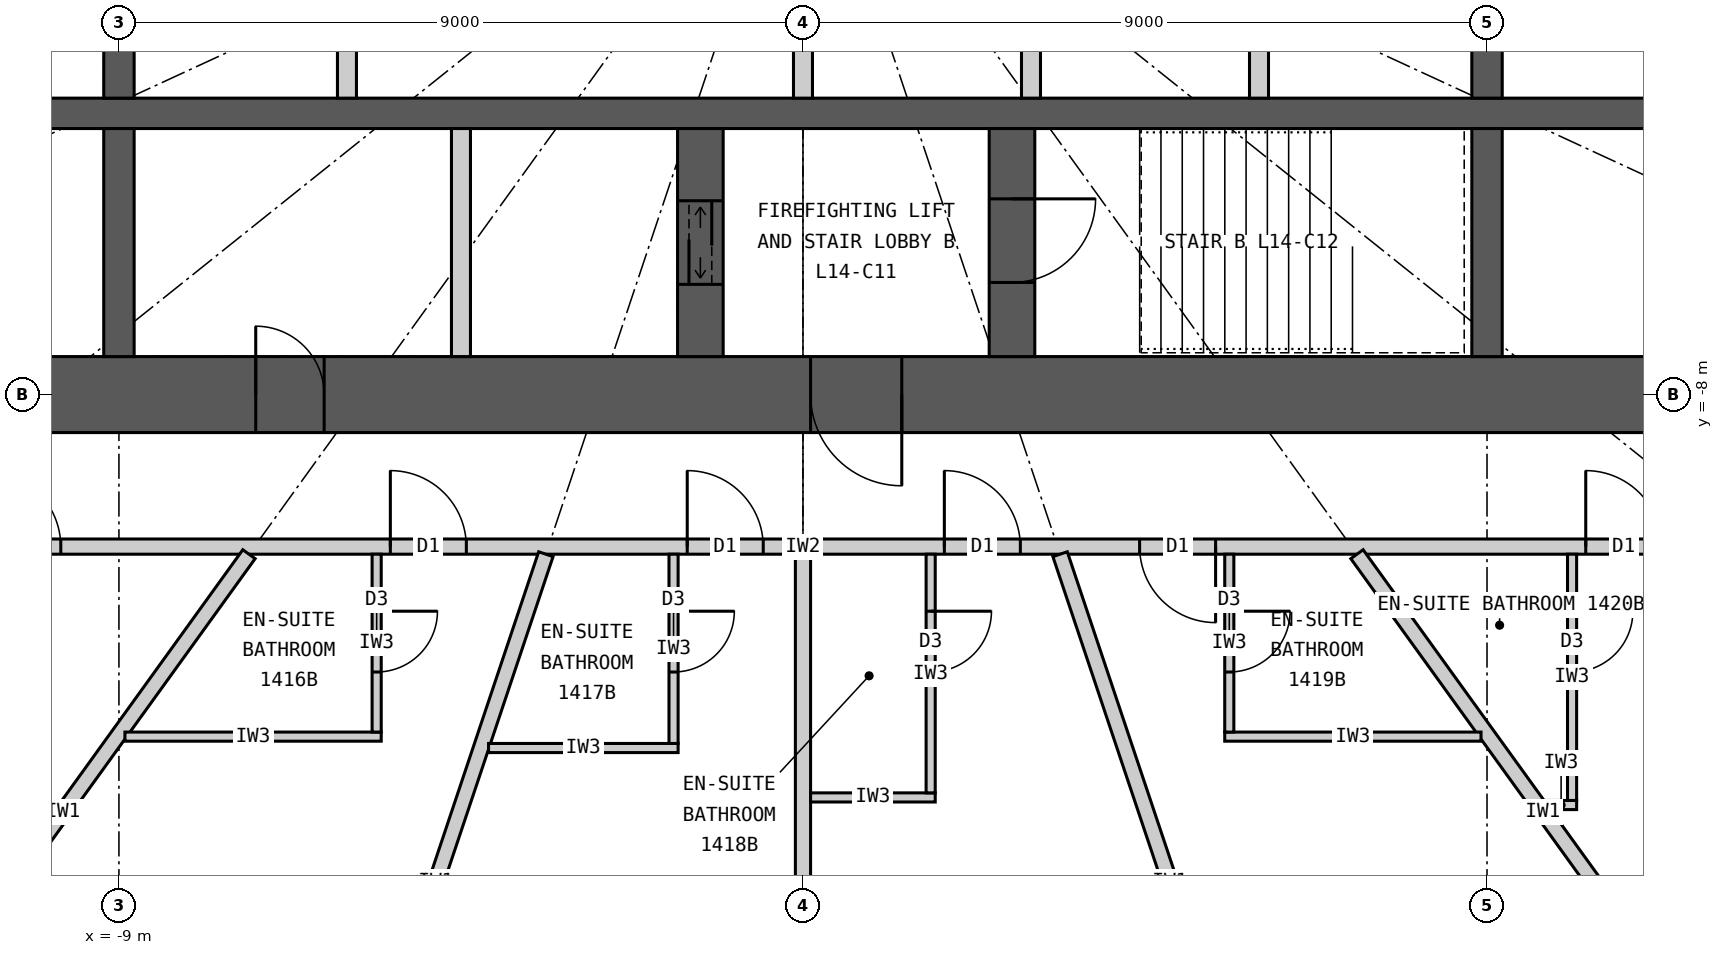
"""IFC4 building model, lengths in metres.
Left out: names, types, materials, properties, quantities, classifications, styles, units other than length and angle.
Written with IfcOpenShell. Run it as: python <this file> out.ifc"""

import sys

from ifc_helpers import new_model, si_unit, direction, frame, frame_2d, origin, place, context, subcontext, project, spatial, rectangle, extrude, element, fill, save


model = new_model("IFC4")
c1 = context("Model", 3, precision=1e-05, world=origin(), true_north=direction((0.0, 1.0)))
c2 = subcontext(c1, "Body", "Model", "MODEL_VIEW")
j1 = project(units=[si_unit("LENGTHUNIT", "METRE"), si_unit("PLANEANGLEUNIT", "RADIAN")], contexts=[c1])
p1 = place(None, origin())
s1 = spatial("IfcSite", under=j1, at=p1, CompositionType="ELEMENT")
p2 = place(p1, origin())
s2 = spatial("IfcBuilding", under=s1, at=p2, CompositionType="ELEMENT")
p3 = place(p2, frame((0.0, 0.0, 60.6)))
s3 = spatial("IfcBuildingStorey", under=s2, at=p3, CompositionType="ELEMENT", Elevation=60.6)
p4 = place(p3, frame((12.5, -8.0, 0.0), z_axis=(0.0, 0.0, 1.0), x_axis=(-1.0, 0.0, 0.0)))
e1 = element("IfcWall", 1, at=p4, inside=s3, PredefinedType="SHEAR", context=c2, shape_type="SweptSolid", body=[
    extrude(rectangle(XDim=25.0, YDim=1.0, at=frame_2d((12.5, 0.0))), origin(), (0.0, 0.0, 1.0), 3.3),
])
p5 = place(p4, frame((11.2, 0.0, 0.0)))
e2 = element("IfcOpeningElement", 2, at=p5, cuts=e1, PredefinedType="OPENING", context=c2, shape_type="SweptSolid", body=[
    extrude(rectangle(XDim=1.2, YDim=2.2, at=frame_2d((0.6, 1.1))), frame((0.0, 0.51, 0.0), z_axis=(0.0, -1.0, 0.0), x_axis=(1.0, 0.0, 0.0)), (0.0, 0.0, 1.0), 1.02),
])
p6 = place(p4, frame((18.8, 0.0, 0.0)))
e3 = element("IfcOpeningElement", 3, at=p6, cuts=e1, PredefinedType="OPENING", context=c2, shape_type="SweptSolid", body=[
    extrude(rectangle(XDim=0.9, YDim=2.2, at=frame_2d((0.45, 1.1))), frame((0.0, 0.51, 0.0), z_axis=(0.0, -1.0, 0.0), x_axis=(1.0, 0.0, 0.0)), (0.0, 0.0, 1.0), 1.02),
])
p7 = place(p3, frame((-11.5, -4.3, 0.0), z_axis=(0.0, 0.0, 1.0), x_axis=(1.0, 0.0, 0.0)))
e4 = element("IfcWall", 4, at=p7, inside=s3, PredefinedType="SHEAR", context=c2, shape_type="SweptSolid", body=[
    extrude(rectangle(XDim=23.0, YDim=0.4, at=frame_2d((11.5, 0.0))), origin(), (0.0, 0.0, 1.0), 3.3),
])
p8 = place(p3, frame((-9.0, -4.1, 0.0), z_axis=(0.0, 0.0, 1.0), x_axis=(0.0, 1.0, 0.0)))
e5 = element("IfcWall", 5, at=p8, inside=s3, PredefinedType="SHEAR", context=c2, shape_type="SweptSolid", body=[
    extrude(rectangle(XDim=2.35, YDim=0.4, at=frame_2d((1.175, 0.0))), origin(), (0.0, 0.0, 1.0), 3.3),
])
p9 = place(p3, frame((-9.0, -7.5, 0.0), z_axis=(0.0, 0.0, 1.0), x_axis=(0.0, 1.0, 0.0)))
e6 = element("IfcWall", 6, at=p9, inside=s3, PredefinedType="SHEAR", context=c2, shape_type="SweptSolid", body=[
    extrude(rectangle(XDim=3.0, YDim=0.4, at=frame_2d((1.5, 0.0))), origin(), (0.0, 0.0, 1.0), 3.3),
])
p10 = place(p3, frame((9.0, -4.1, 0.0), z_axis=(0.0, 0.0, 1.0), x_axis=(0.0, 1.0, 0.0)))
e7 = element("IfcWall", 7, at=p10, inside=s3, PredefinedType="SHEAR", context=c2, shape_type="SweptSolid", body=[
    extrude(rectangle(XDim=2.35, YDim=0.4, at=frame_2d((1.175, 0.0))), origin(), (0.0, 0.0, 1.0), 3.3),
])
p11 = place(p3, frame((9.0, -7.5, 0.0), z_axis=(0.0, 0.0, 1.0), x_axis=(0.0, 1.0, 0.0)))
e8 = element("IfcWall", 8, at=p11, inside=s3, PredefinedType="SHEAR", context=c2, shape_type="SweptSolid", body=[
    extrude(rectangle(XDim=3.0, YDim=0.4, at=frame_2d((1.5, 0.0))), origin(), (0.0, 0.0, 1.0), 3.3),
])
p12 = place(p3, frame((2.75, -7.5, 0.0), z_axis=(0.0, 0.0, 1.0), x_axis=(0.0, 1.0, 0.0)))
e9 = element("IfcWall", 9, at=p12, inside=s3, PredefinedType="SHEAR", context=c2, shape_type="SweptSolid", body=[
    extrude(rectangle(XDim=3.0, YDim=0.6, at=frame_2d((1.5, 0.0))), origin(), (0.0, 0.0, 1.0), 3.3),
])
p13 = place(p12, frame((0.975, 0.0, 0.0)))
e10 = element("IfcOpeningElement", 10, at=p13, cuts=e9, PredefinedType="OPENING", context=c2, shape_type="SweptSolid", body=[
    extrude(rectangle(XDim=1.1, YDim=2.2, at=frame_2d((0.55, 1.1))), frame((0.0, 0.31, 0.0), z_axis=(0.0, -1.0, 0.0), x_axis=(1.0, 0.0, 0.0)), (0.0, 0.0, 1.0), 0.62),
])
p14 = place(p3, frame((-1.35, -7.5, 0.0), z_axis=(0.0, 0.0, 1.0), x_axis=(0.0, 1.0, 0.0)))
e11 = element("IfcWall", 11, at=p14, inside=s3, PredefinedType="SHEAR", context=c2, shape_type="SweptSolid", body=[
    extrude(rectangle(XDim=3.0, YDim=0.6, at=frame_2d((1.5, 0.0))), origin(), (0.0, 0.0, 1.0), 3.3),
])
p15 = place(p14, frame((0.95, 0.0, 0.0)))
e12 = element("IfcOpeningElement", 12, at=p15, cuts=e11, PredefinedType="OPENING", context=c2, shape_type="SweptSolid", body=[
    extrude(rectangle(XDim=1.1, YDim=2.2, at=frame_2d((0.55, 1.1))), frame((0.0, 0.31, 0.0), z_axis=(0.0, -1.0, 0.0), x_axis=(1.0, 0.0, 0.0)), (0.0, 0.0, 1.0), 0.62),
])
p16 = place(p3, frame((-4.5, -7.5, 0.0), z_axis=(0.0, 0.0, 1.0), x_axis=(0.0, 1.0, 0.0)))
e13 = element("IfcWall", 13, at=p16, inside=s3, PredefinedType="PARTITIONING", context=c2, shape_type="SweptSolid", body=[
    extrude(rectangle(XDim=3.0, YDim=0.25, at=frame_2d((1.5, 0.0))), origin(), (0.0, 0.0, 1.0), 3.3),
])
for number, where, z_axis, x_axis in (
    (14, (-6.0, -4.1, 0.0), (0.0, 0.0, 1.0), (0.0, 1.0, 0.0)),
    (15, (0.0, -4.1, 0.0), (0.0, 0.0, 1.0), (0.0, 1.0, 0.0)),
    (16, (3.0, -4.1, 0.0), (0.0, 0.0, 1.0), (0.0, 1.0, 0.0)),
    (17, (6.0, -4.1, 0.0), (0.0, 0.0, 1.0), (0.0, 1.0, 0.0)),
):
    element("IfcWall", number, at=place(p3, frame(where, z_axis=z_axis, x_axis=x_axis)), inside=s3, PredefinedType="PARTITIONING", context=c2, shape_type="SweptSolid", body=[
        extrude(rectangle(XDim=2.35, YDim=0.25, at=frame_2d((1.175, 0.0))), origin(), (0.0, 0.0, 1.0), 3.3),
    ])
p17 = place(p3, frame((14.1, -10.0, 0.0), z_axis=(0.0, 0.0, 1.0), x_axis=(-1.0, 0.0, 0.0)))
e18 = element("IfcWall", 18, at=p17, inside=s3, PredefinedType="PARTITIONING", context=c2, shape_type="SweptSolid", body=[
    extrude(rectangle(XDim=28.2, YDim=0.2, at=frame_2d((14.1, 0.0))), origin(), (0.0, 0.0, 1.0), 3.12),
])
p18 = place(p17, frame((23.865, 0.0, 0.0)))
e19 = element("IfcOpeningElement", 19, at=p18, cuts=e18, PredefinedType="OPENING", context=c2, shape_type="SweptSolid", body=[
    extrude(rectangle(XDim=1.0, YDim=2.2, at=frame_2d((0.5, 1.1))), frame((0.0, 0.11, 0.0), z_axis=(0.0, -1.0, 0.0), x_axis=(1.0, 0.0, 0.0)), (0.0, 0.0, 1.0), 0.22),
])
p19 = place(p17, frame((18.529, 0.0, 0.0)))
e20 = element("IfcOpeningElement", 20, at=p19, cuts=e18, PredefinedType="OPENING", context=c2, shape_type="SweptSolid", body=[
    extrude(rectangle(XDim=1.0, YDim=2.2, at=frame_2d((0.5, 1.1))), frame((0.0, 0.11, 0.0), z_axis=(0.0, -1.0, 0.0), x_axis=(1.0, 0.0, 0.0)), (0.0, 0.0, 1.0), 0.22),
])
p20 = place(p17, frame((14.623, 0.0, 0.0)))
e21 = element("IfcOpeningElement", 21, at=p20, cuts=e18, PredefinedType="OPENING", context=c2, shape_type="SweptSolid", body=[
    extrude(rectangle(XDim=1.0, YDim=2.2, at=frame_2d((0.5, 1.1))), frame((0.0, 0.11, 0.0), z_axis=(0.0, -1.0, 0.0), x_axis=(1.0, 0.0, 0.0)), (0.0, 0.0, 1.0), 0.22),
])
p21 = place(p17, frame((11.24, 0.0, 0.0)))
e22 = element("IfcOpeningElement", 22, at=p21, cuts=e18, PredefinedType="OPENING", context=c2, shape_type="SweptSolid", body=[
    extrude(rectangle(XDim=1.0, YDim=2.2, at=frame_2d((0.5, 1.1))), frame((0.0, 0.11, 0.0), z_axis=(0.0, -1.0, 0.0), x_axis=(1.0, 0.0, 0.0)), (0.0, 0.0, 1.0), 0.22),
])
p22 = place(p17, frame((8.671, 0.0, 0.0)))
e23 = element("IfcOpeningElement", 23, at=p22, cuts=e18, PredefinedType="OPENING", context=c2, shape_type="SweptSolid", body=[
    extrude(rectangle(XDim=1.0, YDim=2.2, at=frame_2d((0.5, 1.1))), frame((0.0, 0.11, 0.0), z_axis=(0.0, -1.0, 0.0), x_axis=(1.0, 0.0, 0.0)), (0.0, 0.0, 1.0), 0.22),
])
p23 = place(p17, frame((2.801, 0.0, 0.0)))
e24 = element("IfcOpeningElement", 24, at=p23, cuts=e18, PredefinedType="OPENING", context=c2, shape_type="SweptSolid", body=[
    extrude(rectangle(XDim=1.0, YDim=2.2, at=frame_2d((0.5, 1.1))), frame((0.0, 0.11, 0.0), z_axis=(0.0, -1.0, 0.0), x_axis=(1.0, 0.0, 0.0)), (0.0, 0.0, 1.0), 0.22),
])
p24 = place(p3, frame((-7.289, -10.1, 0.0), z_axis=(0.0, 0.0, 1.0), x_axis=(-0.585198353053, -0.810890182197, 0.0)))
e25 = element("IfcWall", 25, at=p24, inside=s3, PredefinedType="PARTITIONING", context=c2, shape_type="SweptSolid", body=[
    extrude(rectangle(XDim=8.36, YDim=0.2, at=frame_2d((4.18, 0.0))), origin(), (0.0, 0.0, 1.0), 2.32),
])
p25 = place(p3, frame((-3.383, -10.1, 0.0), z_axis=(0.0, 0.0, 1.0), x_axis=(-0.31759592231, -0.948226149256, 0.0)))
e26 = element("IfcWall", 26, at=p25, inside=s3, PredefinedType="PARTITIONING", context=c2, shape_type="SweptSolid", body=[
    extrude(rectangle(XDim=9.098, YDim=0.2, at=frame_2d((4.549, 0.0))), origin(), (0.0, 0.0, 1.0), 2.32),
])
p26 = place(p3, frame((0.0, -10.1, 0.0), z_axis=(0.0, 0.0, 1.0), x_axis=(0.0, -1.0, 0.0)))
e27 = element("IfcWall", 27, at=p26, inside=s3, PredefinedType="PARTITIONING", context=c2, shape_type="SweptSolid", body=[
    extrude(rectangle(XDim=9.25, YDim=0.2, at=frame_2d((4.625, 0.0))), origin(), (0.0, 0.0, 1.0), 2.32),
])
p27 = place(p3, frame((3.383, -10.1, 0.0), z_axis=(0.0, 0.0, 1.0), x_axis=(0.31759592231, -0.948226149256, 0.0)))
e28 = element("IfcWall", 28, at=p27, inside=s3, PredefinedType="PARTITIONING", context=c2, shape_type="SweptSolid", body=[
    extrude(rectangle(XDim=9.098, YDim=0.2, at=frame_2d((4.549, 0.0))), origin(), (0.0, 0.0, 1.0), 2.32),
])
p28 = place(p3, frame((7.289, -10.1, 0.0), z_axis=(0.0, 0.0, 1.0), x_axis=(0.585198353053, -0.810890182197, 0.0)))
e29 = element("IfcWall", 29, at=p28, inside=s3, PredefinedType="PARTITIONING", context=c2, shape_type="SweptSolid", body=[
    extrude(rectangle(XDim=8.36, YDim=0.2, at=frame_2d((4.18, 0.0))), origin(), (0.0, 0.0, 1.0), 2.32),
])
p29 = place(p3, frame((-8.921, -12.5, 0.0), z_axis=(0.0, 0.0, 1.0), x_axis=(1.0, 0.0, 0.0)))
e30 = element("IfcWall", 30, at=p29, inside=s3, PredefinedType="PARTITIONING", context=c2, shape_type="SweptSolid", body=[
    extrude(rectangle(XDim=3.372, YDim=0.12, at=frame_2d((1.686, 0.0))), origin(), (0.0, 0.0, 1.0), 3.12),
])
p30 = place(p3, frame((-5.609, -10.1, 0.0), z_axis=(0.0, 0.0, 1.0), x_axis=(0.0, -1.0, 0.0)))
e31 = element("IfcWall", 31, at=p30, inside=s3, PredefinedType="PARTITIONING", context=c2, shape_type="SweptSolid", body=[
    extrude(rectangle(XDim=2.34, YDim=0.12, at=frame_2d((1.17, 0.0))), origin(), (0.0, 0.0, 1.0), 3.12),
])
p31 = place(p30, frame((0.75, 0.0, 0.0)))
e32 = element("IfcOpeningElement", 32, at=p31, cuts=e31, PredefinedType="OPENING", context=c2, shape_type="SweptSolid", body=[
    extrude(rectangle(XDim=0.8, YDim=2.1, at=frame_2d((0.4, 1.05))), frame((0.0, 0.07, 0.0), z_axis=(0.0, -1.0, 0.0), x_axis=(1.0, 0.0, 0.0)), (0.0, 0.0, 1.0), 0.14),
])
p32 = place(p3, frame((-4.137, -12.65, 0.0), z_axis=(0.0, 0.0, 1.0), x_axis=(1.0, 0.0, 0.0)))
e33 = element("IfcWall", 33, at=p32, inside=s3, PredefinedType="PARTITIONING", context=c2, shape_type="SweptSolid", body=[
    extrude(rectangle(XDim=2.494, YDim=0.12, at=frame_2d((1.247, 0.0))), origin(), (0.0, 0.0, 1.0), 3.12),
])
p33 = place(p3, frame((-1.703, -10.1, 0.0), z_axis=(0.0, 0.0, 1.0), x_axis=(0.0, -1.0, 0.0)))
e34 = element("IfcWall", 34, at=p33, inside=s3, PredefinedType="PARTITIONING", context=c2, shape_type="SweptSolid", body=[
    extrude(rectangle(XDim=2.49, YDim=0.12, at=frame_2d((1.245, 0.0))), origin(), (0.0, 0.0, 1.0), 3.12),
])
p34 = place(p33, frame((0.75, 0.0, 0.0)))
e35 = element("IfcOpeningElement", 35, at=p34, cuts=e34, PredefinedType="OPENING", context=c2, shape_type="SweptSolid", body=[
    extrude(rectangle(XDim=0.8, YDim=2.1, at=frame_2d((0.4, 1.05))), frame((0.0, 0.07, 0.0), z_axis=(0.0, -1.0, 0.0), x_axis=(1.0, 0.0, 0.0)), (0.0, 0.0, 1.0), 0.14),
])
p35 = place(p3, frame((0.1, -13.3, 0.0), z_axis=(0.0, 0.0, 1.0), x_axis=(1.0, 0.0, 0.0)))
e36 = element("IfcWall", 36, at=p35, inside=s3, PredefinedType="PARTITIONING", context=c2, shape_type="SweptSolid", body=[
    extrude(rectangle(XDim=1.64, YDim=0.12, at=frame_2d((0.82, 0.0))), origin(), (0.0, 0.0, 1.0), 3.12),
])
p36 = place(p3, frame((1.68, -10.1, 0.0), z_axis=(0.0, 0.0, 1.0), x_axis=(0.0, -1.0, 0.0)))
e37 = element("IfcWall", 37, at=p36, inside=s3, PredefinedType="PARTITIONING", context=c2, shape_type="SweptSolid", body=[
    extrude(rectangle(XDim=3.14, YDim=0.12, at=frame_2d((1.57, 0.0))), origin(), (0.0, 0.0, 1.0), 3.12),
])
p37 = place(p36, frame((0.75, 0.0, 0.0)))
e38 = element("IfcOpeningElement", 38, at=p37, cuts=e37, PredefinedType="OPENING", context=c2, shape_type="SweptSolid", body=[
    extrude(rectangle(XDim=0.8, YDim=2.1, at=frame_2d((0.4, 1.05))), frame((0.0, 0.07, 0.0), z_axis=(0.0, -1.0, 0.0), x_axis=(1.0, 0.0, 0.0)), (0.0, 0.0, 1.0), 0.14),
])
p38 = place(p3, frame((8.921, -12.5, 0.0), z_axis=(0.0, 0.0, 1.0), x_axis=(-1.0, 0.0, 0.0)))
e39 = element("IfcWall", 39, at=p38, inside=s3, PredefinedType="PARTITIONING", context=c2, shape_type="SweptSolid", body=[
    extrude(rectangle(XDim=3.372, YDim=0.12, at=frame_2d((1.686, 0.0))), origin(), (0.0, 0.0, 1.0), 3.12),
])
p39 = place(p3, frame((5.609, -10.1, 0.0), z_axis=(0.0, 0.0, 1.0), x_axis=(0.0, -1.0, 0.0)))
e40 = element("IfcWall", 40, at=p39, inside=s3, PredefinedType="PARTITIONING", context=c2, shape_type="SweptSolid", body=[
    extrude(rectangle(XDim=2.34, YDim=0.12, at=frame_2d((1.17, 0.0))), origin(), (0.0, 0.0, 1.0), 3.12),
])
p40 = place(p39, frame((0.75, 0.0, 0.0)))
e41 = element("IfcOpeningElement", 41, at=p40, cuts=e40, PredefinedType="OPENING", context=c2, shape_type="SweptSolid", body=[
    extrude(rectangle(XDim=0.8, YDim=2.1, at=frame_2d((0.4, 1.05))), frame((0.0, 0.07, 0.0), z_axis=(0.0, -1.0, 0.0), x_axis=(1.0, 0.0, 0.0)), (0.0, 0.0, 1.0), 0.14),
])
p41 = place(p3, frame((9.771, -13.4, 0.0), z_axis=(0.0, 0.0, 1.0), x_axis=(1.0, 0.0, 0.0)))
e42 = element("IfcWall", 42, at=p41, inside=s3, PredefinedType="PARTITIONING", context=c2, shape_type="SweptSolid", body=[
    extrude(rectangle(XDim=0.408, YDim=0.12, at=frame_2d((0.204, 0.0))), origin(), (0.0, 0.0, 1.0), 3.12),
])
p42 = place(p3, frame((10.119, -10.1, 0.0), z_axis=(0.0, 0.0, 1.0), x_axis=(0.0, -1.0, 0.0)))
e43 = element("IfcWall", 43, at=p42, inside=s3, PredefinedType="PARTITIONING", context=c2, shape_type="SweptSolid", body=[
    extrude(rectangle(XDim=3.24, YDim=0.12, at=frame_2d((1.62, 0.0))), origin(), (0.0, 0.0, 1.0), 3.12),
])
p43 = place(p42, frame((0.75, 0.0, 0.0)))
e44 = element("IfcOpeningElement", 44, at=p43, cuts=e43, PredefinedType="OPENING", context=c2, shape_type="SweptSolid", body=[
    extrude(rectangle(XDim=0.8, YDim=2.1, at=frame_2d((0.4, 1.05))), frame((0.0, 0.07, 0.0), z_axis=(0.0, -1.0, 0.0), x_axis=(1.0, 0.0, 0.0)), (0.0, 0.0, 1.0), 0.14),
])
p44 = place(p18, origin())
e45 = element("IfcDoor", 45, at=p44, inside=s3, OperationType="SINGLE_SWING_RIGHT", PredefinedType="DOOR", context=c2, shape_type="SweptSolid", body=[
    extrude(rectangle(XDim=1.0, YDim=2.2, at=frame_2d((0.5, 1.1))), frame((0.0, 0.025, 0.0), z_axis=(0.0, -1.0, 0.0), x_axis=(1.0, 0.0, 0.0)), (0.0, 0.0, 1.0), 0.05),
])
fill(e19, e45)
p45 = place(p31, origin())
e46 = element("IfcDoor", 46, at=p45, inside=s3, OperationType="SINGLE_SWING_LEFT", PredefinedType="DOOR", context=c2, shape_type="SweptSolid", body=[
    extrude(rectangle(XDim=0.8, YDim=2.1, at=frame_2d((0.4, 1.05))), frame((0.0, 0.025, 0.0), z_axis=(0.0, -1.0, 0.0), x_axis=(1.0, 0.0, 0.0)), (0.0, 0.0, 1.0), 0.05),
])
fill(e32, e46)
p46 = place(p19, origin())
e47 = element("IfcDoor", 47, at=p46, inside=s3, OperationType="SINGLE_SWING_RIGHT", PredefinedType="DOOR", context=c2, shape_type="SweptSolid", body=[
    extrude(rectangle(XDim=1.0, YDim=2.2, at=frame_2d((0.5, 1.1))), frame((0.0, 0.025, 0.0), z_axis=(0.0, -1.0, 0.0), x_axis=(1.0, 0.0, 0.0)), (0.0, 0.0, 1.0), 0.05),
])
fill(e20, e47)
p47 = place(p34, origin())
e48 = element("IfcDoor", 48, at=p47, inside=s3, OperationType="SINGLE_SWING_LEFT", PredefinedType="DOOR", context=c2, shape_type="SweptSolid", body=[
    extrude(rectangle(XDim=0.8, YDim=2.1, at=frame_2d((0.4, 1.05))), frame((0.0, 0.025, 0.0), z_axis=(0.0, -1.0, 0.0), x_axis=(1.0, 0.0, 0.0)), (0.0, 0.0, 1.0), 0.05),
])
fill(e35, e48)
p48 = place(p20, origin())
e49 = element("IfcDoor", 49, at=p48, inside=s3, OperationType="SINGLE_SWING_RIGHT", PredefinedType="DOOR", context=c2, shape_type="SweptSolid", body=[
    extrude(rectangle(XDim=1.0, YDim=2.2, at=frame_2d((0.5, 1.1))), frame((0.0, 0.025, 0.0), z_axis=(0.0, -1.0, 0.0), x_axis=(1.0, 0.0, 0.0)), (0.0, 0.0, 1.0), 0.05),
])
fill(e21, e49)
p49 = place(p37, origin())
e50 = element("IfcDoor", 50, at=p49, inside=s3, OperationType="SINGLE_SWING_LEFT", PredefinedType="DOOR", context=c2, shape_type="SweptSolid", body=[
    extrude(rectangle(XDim=0.8, YDim=2.1, at=frame_2d((0.4, 1.05))), frame((0.0, 0.025, 0.0), z_axis=(0.0, -1.0, 0.0), x_axis=(1.0, 0.0, 0.0)), (0.0, 0.0, 1.0), 0.05),
])
fill(e38, e50)
p50 = place(p21, origin())
e51 = element("IfcDoor", 51, at=p50, inside=s3, OperationType="SINGLE_SWING_RIGHT", PredefinedType="DOOR", context=c2, shape_type="SweptSolid", body=[
    extrude(rectangle(XDim=1.0, YDim=2.2, at=frame_2d((0.5, 1.1))), frame((0.0, 0.025, 0.0), z_axis=(0.0, -1.0, 0.0), x_axis=(1.0, 0.0, 0.0)), (0.0, 0.0, 1.0), 0.05),
])
fill(e22, e51)
p51 = place(p40, origin())
e52 = element("IfcDoor", 52, at=p51, inside=s3, OperationType="SINGLE_SWING_LEFT", PredefinedType="DOOR", context=c2, shape_type="SweptSolid", body=[
    extrude(rectangle(XDim=0.8, YDim=2.1, at=frame_2d((0.4, 1.05))), frame((0.0, 0.025, 0.0), z_axis=(0.0, -1.0, 0.0), x_axis=(1.0, 0.0, 0.0)), (0.0, 0.0, 1.0), 0.05),
])
fill(e41, e52)
p52 = place(p22, origin())
e53 = element("IfcDoor", 53, at=p52, inside=s3, OperationType="SINGLE_SWING_LEFT", PredefinedType="DOOR", context=c2, shape_type="SweptSolid", body=[
    extrude(rectangle(XDim=1.0, YDim=2.2, at=frame_2d((0.5, 1.1))), frame((0.0, 0.025, 0.0), z_axis=(0.0, -1.0, 0.0), x_axis=(1.0, 0.0, 0.0)), (0.0, 0.0, 1.0), 0.05),
])
fill(e23, e53)
p53 = place(p43, origin())
e54 = element("IfcDoor", 54, at=p53, inside=s3, OperationType="SINGLE_SWING_LEFT", PredefinedType="DOOR", context=c2, shape_type="SweptSolid", body=[
    extrude(rectangle(XDim=0.8, YDim=2.1, at=frame_2d((0.4, 1.05))), frame((0.0, 0.025, 0.0), z_axis=(0.0, -1.0, 0.0), x_axis=(1.0, 0.0, 0.0)), (0.0, 0.0, 1.0), 0.05),
])
fill(e44, e54)
p54 = place(p23, origin())
e55 = element("IfcDoor", 55, at=p54, inside=s3, OperationType="SINGLE_SWING_RIGHT", PredefinedType="DOOR", context=c2, shape_type="SweptSolid", body=[
    extrude(rectangle(XDim=1.0, YDim=2.2, at=frame_2d((0.5, 1.1))), frame((0.0, 0.025, 0.0), z_axis=(0.0, -1.0, 0.0), x_axis=(1.0, 0.0, 0.0)), (0.0, 0.0, 1.0), 0.05),
])
fill(e24, e55)
p55 = place(p5, origin())
e56 = element("IfcDoor", 56, at=p55, inside=s3, OperationType="SINGLE_SWING_LEFT", PredefinedType="DOOR", context=c2, shape_type="SweptSolid", body=[
    extrude(rectangle(XDim=1.2, YDim=2.2, at=frame_2d((0.6, 1.1))), frame((0.0, 0.025, 0.0), z_axis=(0.0, -1.0, 0.0), x_axis=(1.0, 0.0, 0.0)), (0.0, 0.0, 1.0), 0.05),
])
fill(e2, e56)
p56 = place(p13, origin())
e57 = element("IfcDoor", 57, at=p56, inside=s3, OperationType="SINGLE_SWING_RIGHT", PredefinedType="DOOR", context=c2, shape_type="SweptSolid", body=[
    extrude(rectangle(XDim=1.1, YDim=2.2, at=frame_2d((0.55, 1.1))), frame((0.0, 0.025, 0.0), z_axis=(0.0, -1.0, 0.0), x_axis=(1.0, 0.0, 0.0)), (0.0, 0.0, 1.0), 0.05),
])
fill(e10, e57)
p57 = place(p15, origin())
e58 = element("IfcDoor", 58, at=p57, inside=s3, OperationType="DOUBLE_DOOR_SLIDING", PredefinedType="DOOR", context=c2, shape_type="SweptSolid", body=[
    extrude(rectangle(XDim=1.1, YDim=2.2, at=frame_2d((0.55, 1.1))), frame((0.0, 0.025, 0.0), z_axis=(0.0, -1.0, 0.0), x_axis=(1.0, 0.0, 0.0)), (0.0, 0.0, 1.0), 0.05),
])
fill(e12, e58)
p58 = place(p6, origin())
e59 = element("IfcDoor", 59, at=p58, inside=s3, OperationType="SINGLE_SWING_RIGHT", PredefinedType="DOOR", context=c2, shape_type="SweptSolid", body=[
    extrude(rectangle(XDim=0.9, YDim=2.2, at=frame_2d((0.45, 1.1))), frame((0.0, 0.025, 0.0), z_axis=(0.0, -1.0, 0.0), x_axis=(1.0, 0.0, 0.0)), (0.0, 0.0, 1.0), 0.05),
])
fill(e3, e59)
save(model, sys.argv[1])
